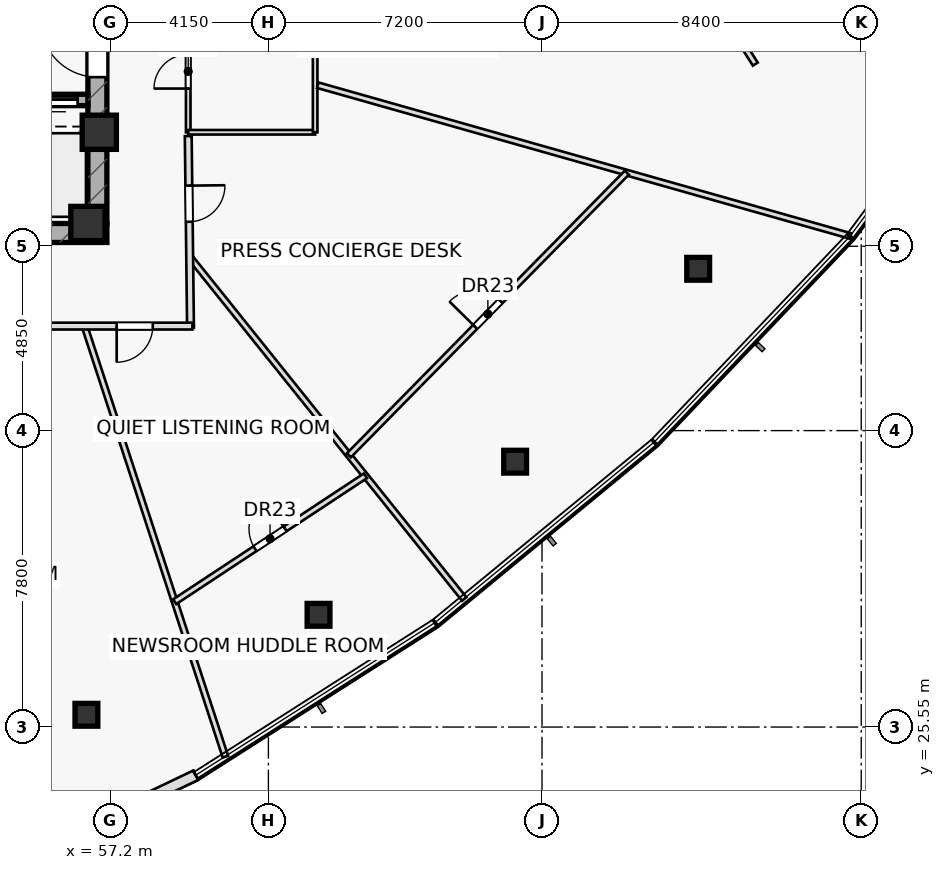
"""IFC4 building model, lengths in metres.
Left out: names, types, materials, properties, quantities, classifications, styles, units other than length and angle.
Written with IfcOpenShell. Run it as: python <this file> out.ifc"""

import sys

from ifc_helpers import new_model, si_unit, direction, frame, frame_2d, origin, origin_2d, place, context, subcontext, project, spatial, rectangle, hollow_rectangle, extrude, element, fill, save


model = new_model("IFC4")
c1 = context("Model", 3, precision=1e-05, world=origin(), true_north=direction((0.0, 1.0)))
c2 = subcontext(c1, "Body", "Model", "MODEL_VIEW")
j1 = project(units=[si_unit("LENGTHUNIT", "METRE"), si_unit("PLANEANGLEUNIT", "RADIAN")], contexts=[c1])
p1 = place(None, origin())
s1 = spatial("IfcSite", under=j1, at=p1, CompositionType="ELEMENT")
p2 = place(p1, origin())
s2 = spatial("IfcBuilding", under=s1, at=p2, CompositionType="ELEMENT")
p3 = place(p2, frame((0.0, 0.0, 184.9)))
s3 = spatial("IfcBuildingStorey", under=s2, at=p3, CompositionType="ELEMENT", Elevation=184.9)
p4 = place(p3, frame((42.9, 38.55, 0.0), z_axis=(0.0, 0.0, 1.0), x_axis=(1.0, 0.0, 0.0)))
e1 = element("IfcWall", 1, at=p4, inside=s3, PredefinedType="SHEAR", context=c2, shape_type="SweptSolid", body=[
    extrude(rectangle(XDim=14.2, YDim=0.5, at=frame_2d((7.1, 0.0))), origin(), (0.0, 0.0, 1.0), 3.55),
])
p5 = place(p4, frame((0.78, 0.0, 0.0)))
e2 = element("IfcOpeningElement", 2, at=p5, cuts=e1, PredefinedType="OPENING", context=c2, shape_type="SweptSolid", body=[
    extrude(rectangle(XDim=1.05, YDim=2.2, at=frame_2d((0.525, 1.1))), frame((0.0, 0.26, 0.0), z_axis=(0.0, -1.0, 0.0), x_axis=(1.0, 0.0, 0.0)), (0.0, 0.0, 1.0), 0.52),
])
p6 = place(p3, frame((56.85, 38.8, 0.0), z_axis=(0.0, 0.0, 1.0), x_axis=(0.0, 1.0, 0.0)))
e3 = element("IfcWall", 3, at=p6, inside=s3, PredefinedType="SHEAR", context=c2, shape_type="SweptSolid", body=[
    extrude(rectangle(XDim=12.4, YDim=0.5, at=frame_2d((6.2, 0.0))), origin(), (0.0, 0.0, 1.0), 3.55),
])
p7 = place(p6, frame((3.85, 0.0, 0.0)))
e4 = element("IfcOpeningElement", 4, at=p7, cuts=e3, PredefinedType="OPENING", context=c2, shape_type="SweptSolid", body=[
    extrude(rectangle(XDim=1.5, YDim=2.2, at=frame_2d((0.75, 1.1))), frame((0.0, 0.26, 0.0), z_axis=(0.0, -1.0, 0.0), x_axis=(1.0, 0.0, 0.0)), (0.0, 0.0, 1.0), 0.52),
])
p8 = place(p3, frame((43.4, 42.05, 0.0), z_axis=(0.0, 0.0, 1.0), x_axis=(1.0, 0.0, 0.0)))
e5 = element("IfcWall", 5, at=p8, inside=s3, PredefinedType="SHEAR", context=c2, shape_type="SweptSolid", body=[
    extrude(rectangle(XDim=13.2, YDim=0.3, at=frame_2d((6.6, 0.0))), origin(), (0.0, 0.0, 1.0), 3.55),
])
p9 = place(p8, frame((8.37, 0.0, 0.0)))
e6 = element("IfcOpeningElement", 6, at=p9, cuts=e5, PredefinedType="OPENING", context=c2, shape_type="SweptSolid", body=[
    extrude(rectangle(XDim=1.1, YDim=2.15, at=frame_2d((0.55, 1.075))), frame((0.0, 0.16, 0.0), z_axis=(0.0, -1.0, 0.0), x_axis=(1.0, 0.0, 0.0)), (0.0, 0.0, 1.0), 0.32),
])
p10 = place(p8, frame((10.09, 0.0, 0.0)))
e7 = element("IfcOpeningElement", 7, at=p10, cuts=e5, PredefinedType="OPENING", context=c2, shape_type="SweptSolid", body=[
    extrude(rectangle(XDim=1.1, YDim=2.15, at=frame_2d((0.55, 1.075))), frame((0.0, 0.16, 0.0), z_axis=(0.0, -1.0, 0.0), x_axis=(1.0, 0.0, 0.0)), (0.0, 0.0, 1.0), 0.32),
])
p11 = place(p8, frame((11.83, 0.0, 0.0)))
e8 = element("IfcOpeningElement", 8, at=p11, cuts=e5, PredefinedType="OPENING", context=c2, shape_type="SweptSolid", body=[
    extrude(rectangle(XDim=1.1, YDim=2.15, at=frame_2d((0.55, 1.075))), frame((0.0, 0.16, 0.0), z_axis=(0.0, -1.0, 0.0), x_axis=(1.0, 0.0, 0.0)), (0.0, 0.0, 1.0), 0.32),
])
for number, where, z_axis, x_axis in (
    (9, (56.9, 41.2, 0.0), (0.0, 0.0, 1.0), (1.0, 0.0, 0.0)),
    (10, (56.6, 38.8, 0.0), (0.0, 0.0, 1.0), (1.0, 0.0, 0.0)),
):
    element("IfcColumn", number, at=place(p3, frame(where, z_axis=z_axis, x_axis=x_axis)), inside=s3, PredefinedType="COLUMN", context=c2, shape_type="SweptSolid", body=[
        extrude(rectangle(XDim=0.9, YDim=0.9, at=origin_2d()), origin(), (0.0, 0.0, 1.0), 3.55),
    ])
for number, where, z_axis, x_axis in (
    (11, (56.561, 25.873, 0.0), (0.0, 0.0, 1.0), (1.0, 0.0, 0.0)),
    (12, (62.669, 28.503, 0.0), (0.0, 0.0, 1.0), (1.0, 0.0, 0.0)),
    (13, (67.842, 32.532, 0.0), (0.0, 0.0, 1.0), (1.0, 0.0, 0.0)),
    (14, (72.659, 37.607, 0.0), (0.0, 0.0, 1.0), (1.0, 0.0, 0.0)),
):
    element("IfcColumn", number, at=place(p3, frame(where, z_axis=z_axis, x_axis=x_axis)), inside=s3, PredefinedType="COLUMN", context=c2, shape_type="SweptSolid", body=[
        extrude(hollow_rectangle(XDim=0.6, YDim=0.6, WallThickness=0.036, at=origin_2d()), origin(), (0.0, 0.0, 1.0), 3.55),
    ])
p12 = place(p3, frame((74.163, 42.993, 0.0), z_axis=(0.0, 0.0, 1.0), x_axis=(-0.53628142437, 0.844039237166, 0.0)))
e15 = element("IfcWall", 15, at=p12, inside=s3, PredefinedType="PARTITIONING", context=c2, shape_type="SweptSolid", body=[
    extrude(rectangle(XDim=10.267, YDim=0.15, at=frame_2d((5.133, 0.0))), origin(), (0.0, 0.0, 1.0), 2.935),
])
p13 = place(p3, frame((59.24, 41.2, 0.0), z_axis=(0.0, 0.0, 1.0), x_axis=(0.0, 1.0, 0.0)))
e16 = element("IfcWall", 16, at=p13, inside=s3, PredefinedType="PARTITIONING", context=c2, shape_type="SweptSolid", body=[
    extrude(rectangle(XDim=7.0, YDim=0.12, at=frame_2d((3.5, 0.0))), origin(), (0.0, 0.0, 1.0), 3.55),
])
p14 = place(p13, frame((1.15, 0.0, 0.0)))
e17 = element("IfcOpeningElement", 17, at=p14, cuts=e16, PredefinedType="OPENING", context=c2, shape_type="SweptSolid", body=[
    extrude(rectangle(XDim=0.9, YDim=2.05, at=frame_2d((0.45, 1.025))), frame((0.0, 0.07, 0.0), z_axis=(0.0, -1.0, 0.0), x_axis=(1.0, 0.0, 0.0)), (0.0, 0.0, 1.0), 0.14),
])
p15 = place(p13, frame((4.7, 0.0, 0.0)))
e18 = element("IfcOpeningElement", 18, at=p15, cuts=e16, PredefinedType="OPENING", context=c2, shape_type="SweptSolid", body=[
    extrude(rectangle(XDim=0.9, YDim=2.05, at=frame_2d((0.45, 1.025))), frame((0.0, 0.07, 0.0), z_axis=(0.0, -1.0, 0.0), x_axis=(1.0, 0.0, 0.0)), (0.0, 0.0, 1.0), 0.14),
])
p16 = place(p3, frame((59.24, 41.2, 0.0), z_axis=(0.0, 0.0, 1.0), x_axis=(1.0, 0.0, 0.0)))
e19 = element("IfcWall", 19, at=p16, inside=s3, PredefinedType="PARTITIONING", context=c2, shape_type="SweptSolid", body=[
    extrude(rectangle(XDim=3.34, YDim=0.12, at=frame_2d((1.67, 0.0))), origin(), (0.0, 0.0, 1.0), 3.55),
])
p17 = place(p3, frame((62.58, 41.2, 0.0), z_axis=(0.0, 0.0, 1.0), x_axis=(0.0, 1.0, 0.0)))
e20 = element("IfcWall", 20, at=p17, inside=s3, PredefinedType="PARTITIONING", context=c2, shape_type="SweptSolid", body=[
    extrude(rectangle(XDim=7.0, YDim=0.12, at=frame_2d((3.5, 0.0))), origin(), (0.0, 0.0, 1.0), 3.55),
])
p18 = place(p3, frame((56.512, 36.1, 0.0), z_axis=(0.0, 0.0, 1.0), x_axis=(0.310939511527, -0.950429702909, 0.0)))
e21 = element("IfcWall", 21, at=p18, inside=s3, PredefinedType="PARTITIONING", context=c2, shape_type="SweptSolid", body=[
    extrude(rectangle(XDim=11.922, YDim=0.15, at=frame_2d((5.961, 0.0))), origin(), (0.0, 0.0, 1.0), 2.935),
])
p19 = place(p3, frame((59.278, 37.923, 0.0), z_axis=(0.0, 0.0, 1.0), x_axis=(0.625811087675, -0.779974667885, 0.0)))
e22 = element("IfcWall", 22, at=p19, inside=s3, PredefinedType="PARTITIONING", context=c2, shape_type="SweptSolid", body=[
    extrude(rectangle(XDim=11.545, YDim=0.15, at=frame_2d((5.772, 0.0))), origin(), (0.0, 0.0, 1.0), 2.935),
])
p20 = place(p3, frame((62.65, 42.438, 0.0), z_axis=(0.0, 0.0, 1.0), x_axis=(0.962191299286, -0.272374564852, 0.0)))
e23 = element("IfcWall", 23, at=p20, inside=s3, PredefinedType="PARTITIONING", context=c2, shape_type="SweptSolid", body=[
    extrude(rectangle(XDim=14.571, YDim=0.15, at=frame_2d((7.286, 0.0))), origin(), (0.0, 0.0, 1.0), 2.935),
])
p21 = place(p3, frame((63.469, 32.7, 0.0), z_axis=(0.0, 0.0, 1.0), x_axis=(0.701171291032, 0.712992861558, 0.0)))
e24 = element("IfcWall", 24, at=p21, inside=s3, PredefinedType="PARTITIONING", context=c2, shape_type="SweptSolid", body=[
    extrude(rectangle(XDim=10.429, YDim=0.15, at=frame_2d((5.215, 0.0))), origin(), (0.0, 0.0, 1.0), 2.935),
])
p22 = place(p21, frame((4.74, 0.0, 0.0)))
e25 = element("IfcOpeningElement", 25, at=p22, cuts=e24, PredefinedType="OPENING", context=c2, shape_type="SweptSolid", body=[
    extrude(rectangle(XDim=0.95, YDim=2.05, at=frame_2d((0.475, 1.025))), frame((0.0, 0.085, 0.0), z_axis=(0.0, -1.0, 0.0), x_axis=(1.0, 0.0, 0.0)), (0.0, 0.0, 1.0), 0.17),
])
p23 = place(p3, frame((58.884, 28.848, 0.0), z_axis=(0.0, 0.0, 1.0), x_axis=(0.834609033184, 0.550842774054, 0.0)))
e26 = element("IfcWall", 26, at=p23, inside=s3, PredefinedType="PARTITIONING", context=c2, shape_type="SweptSolid", body=[
    extrude(rectangle(XDim=6.012, YDim=0.15, at=frame_2d((3.006, 0.0))), origin(), (0.0, 0.0, 1.0), 2.935),
])
p24 = place(p23, frame((2.531, 0.0, 0.0)))
e27 = element("IfcOpeningElement", 27, at=p24, cuts=e26, PredefinedType="OPENING", context=c2, shape_type="SweptSolid", body=[
    extrude(rectangle(XDim=0.95, YDim=2.05, at=frame_2d((0.475, 1.025))), frame((0.0, 0.085, 0.0), z_axis=(0.0, -1.0, 0.0), x_axis=(1.0, 0.0, 0.0)), (0.0, 0.0, 1.0), 0.17),
])
p25 = place(p3, frame((59.24, 41.1, 0.0), z_axis=(0.0, 0.0, 1.0), x_axis=(0.011891834917, -0.999929289631, 0.0)))
e28 = element("IfcWall", 28, at=p25, inside=s3, PredefinedType="PARTITIONING", context=c2, shape_type="SweptSolid", body=[
    extrude(rectangle(XDim=5.05, YDim=0.18, at=frame_2d((2.525, 0.0))), origin(), (0.0, 0.0, 1.0), 2.935),
])
p26 = place(p25, frame((1.305, 0.0, 0.0)))
e29 = element("IfcOpeningElement", 29, at=p26, cuts=e28, PredefinedType="OPENING", context=c2, shape_type="SweptSolid", body=[
    extrude(rectangle(XDim=0.95, YDim=2.05, at=frame_2d((0.475, 1.025))), frame((0.0, 0.1, 0.0), z_axis=(0.0, -1.0, 0.0), x_axis=(1.0, 0.0, 0.0)), (0.0, 0.0, 1.0), 0.2),
])
p27 = place(p3, frame((59.35, 36.1, 0.0), z_axis=(0.0, 0.0, 1.0), x_axis=(-1.0, 0.0, 0.0)))
e30 = element("IfcWall", 30, at=p27, inside=s3, PredefinedType="PARTITIONING", context=c2, shape_type="SweptSolid", body=[
    extrude(rectangle(XDim=19.6, YDim=0.18, at=frame_2d((9.8, 0.0))), origin(), (0.0, 0.0, 1.0), 2.935),
])
p28 = place(p27, frame((1.042, 0.0, 0.0)))
e31 = element("IfcOpeningElement", 31, at=p28, cuts=e30, PredefinedType="OPENING", context=c2, shape_type="SweptSolid", body=[
    extrude(rectangle(XDim=0.95, YDim=2.05, at=frame_2d((0.475, 1.025))), frame((0.0, 0.1, 0.0), z_axis=(0.0, -1.0, 0.0), x_axis=(1.0, 0.0, 0.0)), (0.0, 0.0, 1.0), 0.2),
])
p29 = place(p27, frame((6.048, 0.0, 0.0)))
e32 = element("IfcOpeningElement", 32, at=p29, cuts=e30, PredefinedType="OPENING", context=c2, shape_type="SweptSolid", body=[
    extrude(rectangle(XDim=0.95, YDim=2.05, at=frame_2d((0.475, 1.025))), frame((0.0, 0.1, 0.0), z_axis=(0.0, -1.0, 0.0), x_axis=(1.0, 0.0, 0.0)), (0.0, 0.0, 1.0), 0.2),
])
p30 = place(p27, frame((14.336, 0.0, 0.0)))
e33 = element("IfcOpeningElement", 33, at=p30, cuts=e30, PredefinedType="OPENING", context=c2, shape_type="SweptSolid", body=[
    extrude(rectangle(XDim=0.95, YDim=2.05, at=frame_2d((0.475, 1.025))), frame((0.0, 0.1, 0.0), z_axis=(0.0, -1.0, 0.0), x_axis=(1.0, 0.0, 0.0)), (0.0, 0.0, 1.0), 0.2),
])
p31 = place(p3, frame((52.684, 21.05, 0.0), z_axis=(0.0, 0.0, 1.0), x_axis=(0.902032138124, 0.431668879804, 0.0)))
e34 = element("IfcWall", 34, at=p31, inside=s3, PredefinedType="STANDARD", context=c2, shape_type="SweptSolid", body=[
    extrude(rectangle(XDim=7.489, YDim=0.28, at=frame_2d((3.745, 0.0))), origin(), (0.0, 0.0, 1.0), 3.55),
])
p32 = place(p7, origin())
e35 = element("IfcDoor", 35, at=p32, inside=s3, OperationType="SINGLE_SWING_RIGHT", PredefinedType="DOOR", context=c2, shape_type="SweptSolid", body=[
    extrude(rectangle(XDim=1.5, YDim=2.2, at=frame_2d((0.75, 1.1))), frame((0.0, 0.025, 0.0), z_axis=(0.0, -1.0, 0.0), x_axis=(1.0, 0.0, 0.0)), (0.0, 0.0, 1.0), 0.05),
])
fill(e4, e35)
p33 = place(p14, origin())
e36 = element("IfcDoor", 36, at=p33, inside=s3, OperationType="SINGLE_SWING_LEFT", PredefinedType="DOOR", context=c2, shape_type="SweptSolid", body=[
    extrude(rectangle(XDim=0.9, YDim=2.05, at=frame_2d((0.45, 1.025))), frame((0.0, 0.025, 0.0), z_axis=(0.0, -1.0, 0.0), x_axis=(1.0, 0.0, 0.0)), (0.0, 0.0, 1.0), 0.05),
])
fill(e17, e36)
p34 = place(p22, origin())
e37 = element("IfcDoor", 37, at=p34, inside=s3, OperationType="SINGLE_SWING_LEFT", PredefinedType="DOOR", context=c2, shape_type="SweptSolid", body=[
    extrude(rectangle(XDim=0.95, YDim=2.05, at=frame_2d((0.475, 1.025))), frame((0.0, 0.025, 0.0), z_axis=(0.0, -1.0, 0.0), x_axis=(1.0, 0.0, 0.0)), (0.0, 0.0, 1.0), 0.05),
])
fill(e25, e37)
p35 = place(p24, origin())
e38 = element("IfcDoor", 38, at=p35, inside=s3, OperationType="SINGLE_SWING_RIGHT", PredefinedType="DOOR", context=c2, shape_type="SweptSolid", body=[
    extrude(rectangle(XDim=0.95, YDim=2.05, at=frame_2d((0.475, 1.025))), frame((0.0, 0.025, 0.0), z_axis=(0.0, -1.0, 0.0), x_axis=(1.0, 0.0, 0.0)), (0.0, 0.0, 1.0), 0.05),
])
fill(e27, e38)
p36 = place(p26, origin())
e39 = element("IfcDoor", 39, at=p36, inside=s3, OperationType="SINGLE_SWING_LEFT", PredefinedType="DOOR", context=c2, shape_type="SweptSolid", body=[
    extrude(rectangle(XDim=0.95, YDim=2.05, at=frame_2d((0.475, 1.025))), frame((0.0, 0.025, 0.0), z_axis=(0.0, -1.0, 0.0), x_axis=(1.0, 0.0, 0.0)), (0.0, 0.0, 1.0), 0.05),
])
fill(e29, e39)
p37 = place(p28, origin())
e40 = element("IfcDoor", 40, at=p37, inside=s3, OperationType="SINGLE_SWING_RIGHT", PredefinedType="DOOR", context=c2, shape_type="SweptSolid", body=[
    extrude(rectangle(XDim=0.95, YDim=2.05, at=frame_2d((0.475, 1.025))), frame((0.0, 0.025, 0.0), z_axis=(0.0, -1.0, 0.0), x_axis=(1.0, 0.0, 0.0)), (0.0, 0.0, 1.0), 0.05),
])
fill(e31, e40)
p38 = place(p11, origin())
e41 = element("IfcDoor", 41, at=p38, inside=s3, OperationType="SLIDING_TO_LEFT", PredefinedType="DOOR", context=c2, shape_type="SweptSolid", body=[
    extrude(rectangle(XDim=1.1, YDim=2.15, at=frame_2d((0.55, 1.075))), frame((0.0, 0.025, 0.0), z_axis=(0.0, -1.0, 0.0), x_axis=(1.0, 0.0, 0.0)), (0.0, 0.0, 1.0), 0.05),
])
fill(e8, e41)
save(model, sys.argv[1])
